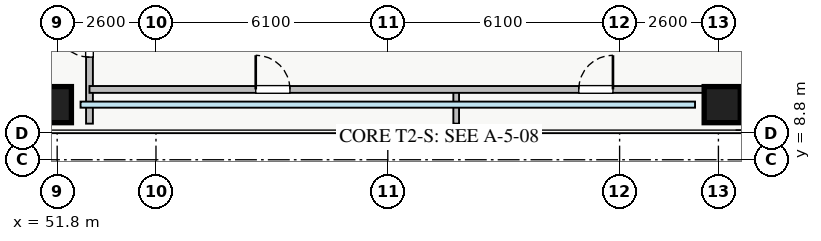
"""IFC4 building model, lengths in metres.
Left out: names, types, materials, properties, quantities, classifications, styles, units other than length and angle.
Written with IfcOpenShell. Run it as: python <this file> out.ifc"""

import sys

from ifc_helpers import new_model, si_unit, direction, frame, frame_2d, origin, origin_2d, place, context, subcontext, project, spatial, rectangle, extrude, source, transform, mapped, element, fill, save


model = new_model("IFC4")
c1 = context("Model", 3, precision=1e-05, world=origin(), true_north=direction((0.0, 1.0)))
c2 = subcontext(c1, "Body", "Model", "MODEL_VIEW")
j1 = project(units=[si_unit("LENGTHUNIT", "METRE"), si_unit("PLANEANGLEUNIT", "RADIAN")], contexts=[c1])
p1 = place(None, origin())
s1 = spatial("IfcSite", under=j1, at=p1, CompositionType="ELEMENT")
p2 = place(p1, origin())
s2 = spatial("IfcBuilding", under=s1, at=p2, CompositionType="ELEMENT")
p3 = place(p2, frame((0.0, 0.0, 60.0)))
s3 = spatial("IfcBuildingStorey", under=s2, at=p3, CompositionType="ELEMENT", Elevation=60.0)
m1 = source(origin(), c2, "Body", "SweptSolid", [
    extrude(rectangle(XDim=0.95, YDim=0.95, at=origin_2d()), origin(), (0.0, 0.0, 1.0), 3.25),
])
for number, where, z_axis, x_axis in (
    (1, (51.7, 10.25, 0.0), (0.0, 0.0, 1.0), (1.0, 0.0, 0.0)),
    (2, (69.3, 10.25, 0.0), (0.0, 0.0, 1.0), (1.0, 0.0, 0.0)),
):
    element("IfcColumn", number, at=place(p3, frame(where, z_axis=z_axis, x_axis=x_axis)), inside=s3, PredefinedType="COLUMN", context=c2, shape_type="MappedRepresentation", body=[
        mapped(m1, transform((0.0, 0.0, 0.0), x_axis=(1.0, 0.0, 0.0), y_axis=(0.0, 1.0, 0.0), z_axis=(0.0, 0.0, 1.0), scale=1.0)),
    ])
p4 = place(p3, frame((52.65, 9.75, 0.0), z_axis=(0.0, 0.0, 1.0), x_axis=(0.0, 1.0, 0.0)))
e3 = element("IfcWall", 3, at=p4, inside=s3, PredefinedType="PARTITIONING", context=c2, shape_type="SweptSolid", body=[
    extrude(rectangle(XDim=26.5, YDim=0.18, at=frame_2d((13.25, 0.0))), origin(), (0.0, 0.0, 1.0), 3.07),
])
p5 = place(p4, frame((23.85, 0.0, 0.0)))
e4 = element("IfcOpeningElement", 4, at=p5, cuts=e3, PredefinedType="OPENING", context=c2, shape_type="SweptSolid", body=[
    extrude(rectangle(XDim=0.9, YDim=2.05, at=frame_2d((0.45, 1.025))), frame((0.0, 0.1, 0.0), z_axis=(0.0, -1.0, 0.0), x_axis=(1.0, 0.0, 0.0)), (0.0, 0.0, 1.0), 0.2),
])
p6 = place(p4, frame((1.75, 0.0, 0.0)))
e5 = element("IfcOpeningElement", 5, at=p6, cuts=e3, PredefinedType="OPENING", context=c2, shape_type="SweptSolid", body=[
    extrude(rectangle(XDim=0.9, YDim=2.05, at=frame_2d((0.45, 1.025))), frame((0.0, 0.1, 0.0), z_axis=(0.0, -1.0, 0.0), x_axis=(1.0, 0.0, 0.0)), (0.0, 0.0, 1.0), 0.2),
])
p7 = place(p4, frame((5.355, 0.0, 0.0)))
e6 = element("IfcOpeningElement", 6, at=p7, cuts=e3, PredefinedType="OPENING", context=c2, shape_type="SweptSolid", body=[
    extrude(rectangle(XDim=1.0, YDim=2.05, at=frame_2d((0.5, 1.025))), frame((0.0, 0.1, 0.0), z_axis=(0.0, -1.0, 0.0), x_axis=(1.0, 0.0, 0.0)), (0.0, 0.0, 1.0), 0.2),
])
p8 = place(p4, frame((15.195, 0.0, 0.0)))
e7 = element("IfcOpeningElement", 7, at=p8, cuts=e3, PredefinedType="OPENING", context=c2, shape_type="SweptSolid", body=[
    extrude(rectangle(XDim=1.0, YDim=2.05, at=frame_2d((0.5, 1.025))), frame((0.0, 0.1, 0.0), z_axis=(0.0, -1.0, 0.0), x_axis=(1.0, 0.0, 0.0)), (0.0, 0.0, 1.0), 0.2),
])
for number, where, z_axis, x_axis in (
    (8, (62.3, 9.75, 0.0), (0.0, 0.0, 1.0), (0.0, 1.0, 0.0)),
    (9, (69.65, 9.75, 0.0), (0.0, 0.0, 1.0), (0.0, 1.0, 0.0)),
):
    element("IfcWall", number, at=place(p3, frame(where, z_axis=z_axis, x_axis=x_axis)), inside=s3, PredefinedType="PARTITIONING", context=c2, shape_type="SweptSolid", body=[
        extrude(rectangle(XDim=0.9, YDim=0.15, at=frame_2d((0.45, 0.0))), origin(), (0.0, 0.0, 1.0), 3.07),
    ])
p9 = place(p3, frame((52.65, 10.65, 0.0), z_axis=(0.0, 0.0, 1.0), x_axis=(1.0, 0.0, 0.0)))
e10 = element("IfcWall", 10, at=p9, inside=s3, PredefinedType="PARTITIONING", context=c2, shape_type="SweptSolid", body=[
    extrude(rectangle(XDim=17.0, YDim=0.18, at=frame_2d((8.5, 0.0))), origin(), (0.0, 0.0, 1.0), 3.07),
])
p10 = place(p9, frame((4.375, 0.0, 0.0)))
e11 = element("IfcOpeningElement", 11, at=p10, cuts=e10, PredefinedType="OPENING", context=c2, shape_type="SweptSolid", body=[
    extrude(rectangle(XDim=0.9, YDim=2.05, at=frame_2d((0.45, 1.025))), frame((0.0, 0.1, 0.0), z_axis=(0.0, -1.0, 0.0), x_axis=(1.0, 0.0, 0.0)), (0.0, 0.0, 1.0), 0.2),
])
p11 = place(p9, frame((12.875, 0.0, 0.0)))
e12 = element("IfcOpeningElement", 12, at=p11, cuts=e10, PredefinedType="OPENING", context=c2, shape_type="SweptSolid", body=[
    extrude(rectangle(XDim=0.9, YDim=2.05, at=frame_2d((0.45, 1.025))), frame((0.0, 0.1, 0.0), z_axis=(0.0, -1.0, 0.0), x_axis=(1.0, 0.0, 0.0)), (0.0, 0.0, 1.0), 0.2),
])
m2 = source(origin(), c2, "Body", "SweptSolid", [
    extrude(rectangle(XDim=0.9, YDim=2.05, at=frame_2d((0.45, 1.025))), frame((0.0, 0.025, 0.0), z_axis=(0.0, -1.0, 0.0), x_axis=(1.0, 0.0, 0.0)), (0.0, 0.0, 1.0), 0.05),
])
p12 = place(p6, origin())
e13 = element("IfcDoor", 13, at=p12, inside=s3, OperationType="SINGLE_SWING_RIGHT", PredefinedType="DOOR", context=c2, shape_type="MappedRepresentation", body=[
    mapped(m2, transform((0.0, 0.0, 0.0), x_axis=(1.0, 0.0, 0.0), y_axis=(0.0, 1.0, 0.0), z_axis=(0.0, 0.0, 1.0), scale=1.0)),
])
fill(e5, e13)
p13 = place(p10, origin())
e14 = element("IfcDoor", 14, at=p13, inside=s3, OperationType="SINGLE_SWING_LEFT", PredefinedType="DOOR", context=c2, shape_type="MappedRepresentation", body=[
    mapped(m2, transform((0.0, 0.0, 0.0), x_axis=(1.0, 0.0, 0.0), y_axis=(0.0, 1.0, 0.0), z_axis=(0.0, 0.0, 1.0), scale=1.0)),
])
fill(e11, e14)
p14 = place(p11, origin())
e15 = element("IfcDoor", 15, at=p14, inside=s3, OperationType="SINGLE_SWING_RIGHT", PredefinedType="DOOR", context=c2, shape_type="MappedRepresentation", body=[
    mapped(m2, transform((0.0, 0.0, 0.0), x_axis=(1.0, 0.0, 0.0), y_axis=(0.0, 1.0, 0.0), z_axis=(0.0, 0.0, 1.0), scale=1.0)),
])
fill(e12, e15)
save(model, sys.argv[1])
